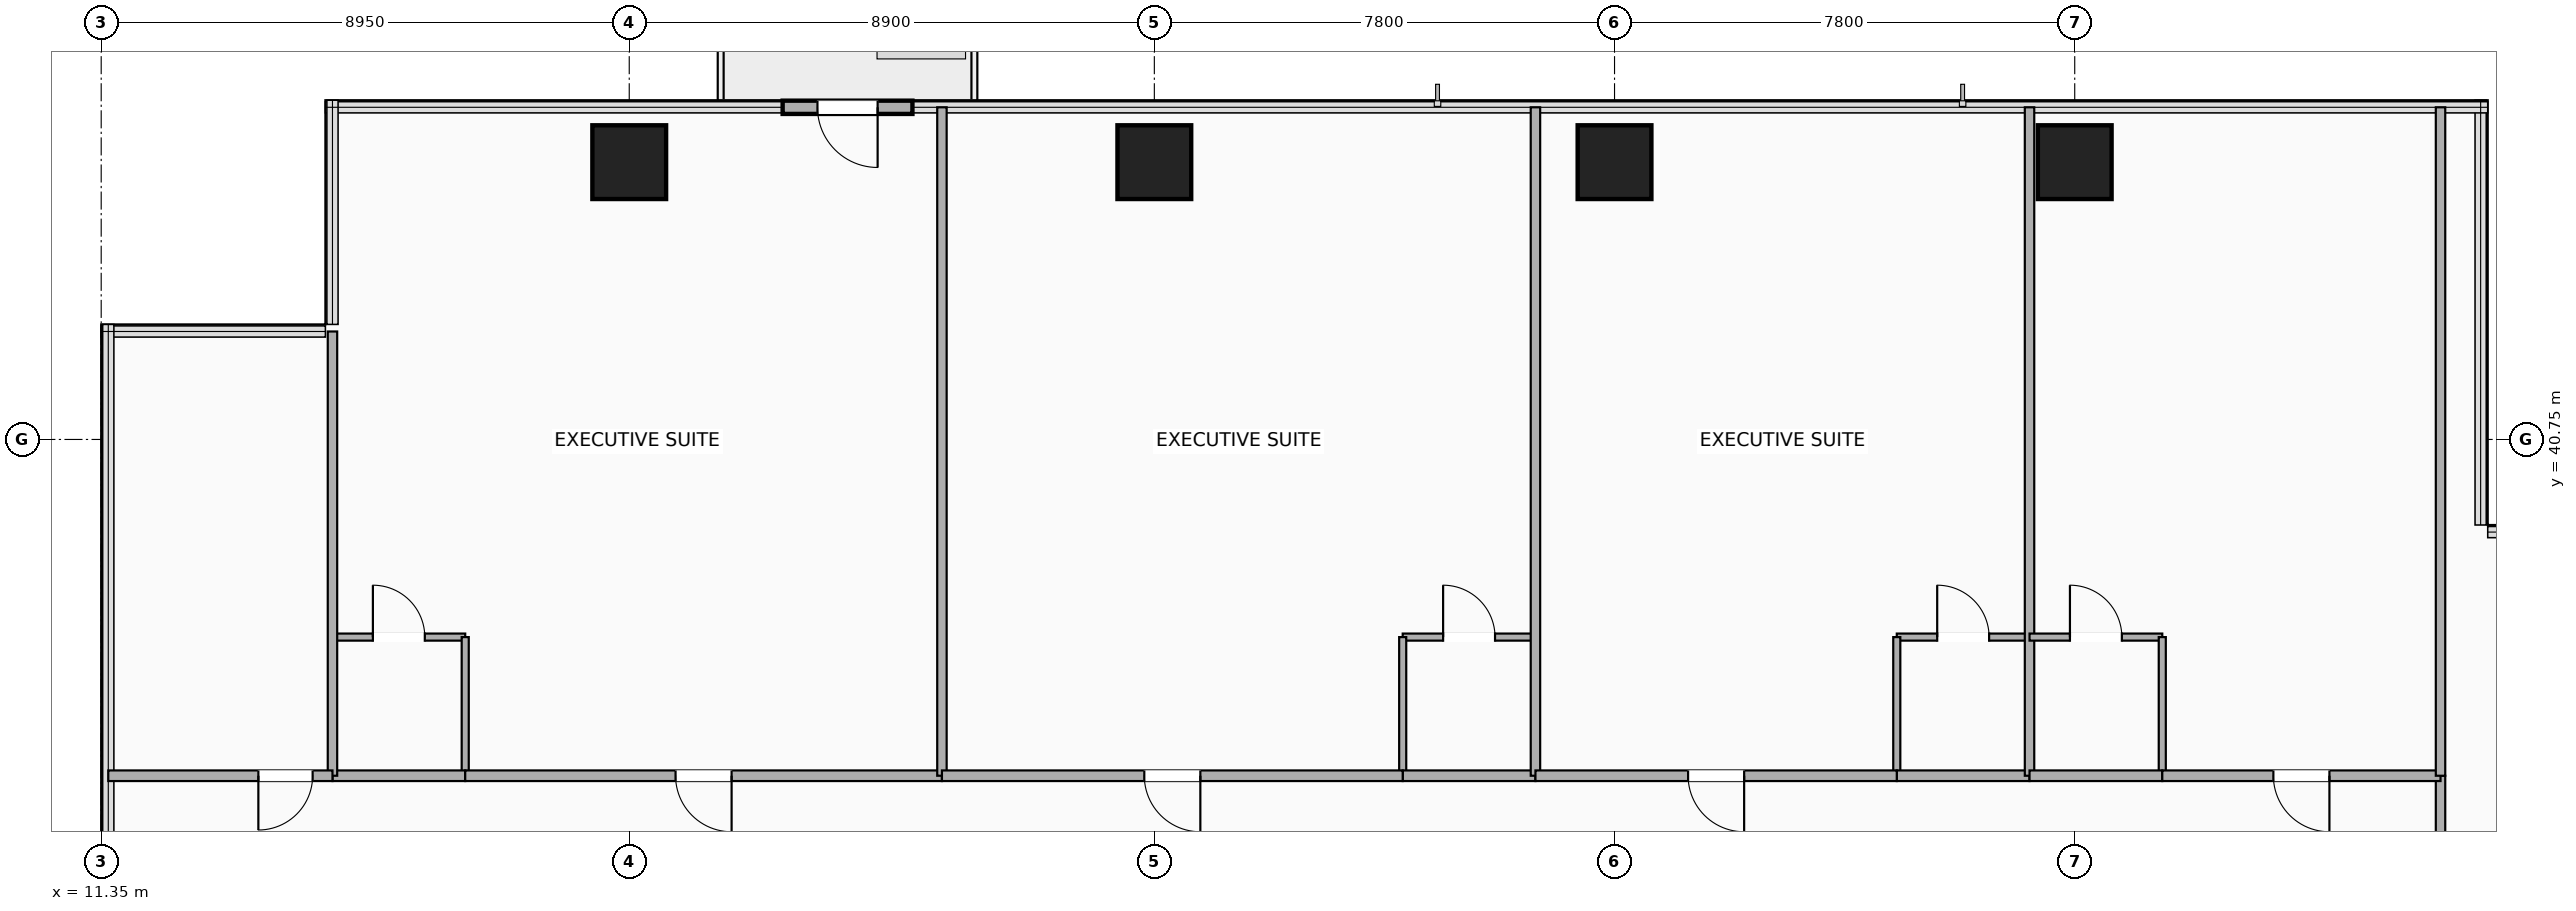
"""IFC4 building model, lengths in metres.
Left out: names, types, materials, properties, quantities, classifications, styles, units other than length and angle.
Written with IfcOpenShell. Run it as: python <this file> out.ifc"""

import sys

from ifc_helpers import new_model, si_unit, direction, frame, frame_2d, origin, origin_2d, place, context, subcontext, project, spatial, rectangle, extrude, element, fill, save


model = new_model("IFC4")
c1 = context("Model", 3, precision=1e-05, world=origin(), true_north=direction((0.0, 1.0)))
c2 = subcontext(c1, "Body", "Model", "MODEL_VIEW")
j1 = project(units=[si_unit("LENGTHUNIT", "METRE"), si_unit("PLANEANGLEUNIT", "RADIAN")], contexts=[c1])
p1 = place(None, origin())
s1 = spatial("IfcSite", under=j1, at=p1, CompositionType="ELEMENT")
p2 = place(p1, origin())
s2 = spatial("IfcBuilding", under=s1, at=p2, CompositionType="ELEMENT")
p3 = place(p2, frame((0.0, 0.0, 95.2)))
s3 = spatial("IfcBuildingStorey", under=s2, at=p3, CompositionType="ELEMENT", Elevation=95.2)
for number, where, z_axis, x_axis in (
    (1, (20.3, 45.45, -0.26), (0.0, 0.0, 1.0), (1.0, 0.0, 0.0)),
    (2, (29.2, 45.45, -0.26), (0.0, 0.0, 1.0), (1.0, 0.0, 0.0)),
    (3, (37.0, 45.45, -0.26), (0.0, 0.0, 1.0), (1.0, 0.0, 0.0)),
    (4, (44.8, 45.45, -0.26), (0.0, 0.0, 1.0), (1.0, 0.0, 0.0)),
):
    element("IfcColumn", number, at=place(p3, frame(where, z_axis=z_axis, x_axis=x_axis)), inside=s3, PredefinedType="COLUMN", context=c2, shape_type="SweptSolid", body=[
        extrude(rectangle(XDim=1.25, YDim=1.25, at=origin_2d()), origin(), (0.0, 0.0, 1.0), 3.5),
    ])
p4 = place(p3, frame((22.9, 46.38, 0.0), z_axis=(0.0, 0.0, 1.0), x_axis=(1.0, 0.0, 0.0)))
e5 = element("IfcWall", 5, at=p4, inside=s3, PredefinedType="SOLIDWALL", context=c2, shape_type="SweptSolid", body=[
    extrude(rectangle(XDim=2.2, YDim=0.225, at=frame_2d((1.1, 0.0))), origin(), (0.0, 0.0, 1.0), 3.24),
])
p5 = place(p4, frame((0.59, 0.0, 0.0)))
e6 = element("IfcOpeningElement", 6, at=p5, cuts=e5, PredefinedType="OPENING", context=c2, shape_type="SweptSolid", body=[
    extrude(rectangle(XDim=1.02, YDim=2.1, at=frame_2d((0.51, 1.05))), frame((0.0, 0.123, 0.0), z_axis=(0.0, -1.0, 0.0), x_axis=(1.0, 0.0, 0.0)), (0.0, 0.0, 1.0), 0.245),
])
p6 = place(p3, frame((51.0, 33.0, 0.0), z_axis=(0.0, 0.0, 1.0), x_axis=(0.0, 1.0, 0.0)))
e7 = element("IfcWall", 7, at=p6, inside=s3, PredefinedType="PARTITIONING", context=c2, shape_type="SweptSolid", body=[
    extrude(rectangle(XDim=2.05, YDim=0.16, at=frame_2d((1.025, 0.0))), origin(), (0.0, 0.0, 1.0), 2.313),
])
p7 = place(p3, frame((15.27, 37.4, 0.0), z_axis=(0.0, 0.0, 1.0), x_axis=(1.0, 0.0, 0.0)))
e8 = element("IfcWall", 8, at=p7, inside=s3, PredefinedType="PARTITIONING", context=c2, shape_type="SweptSolid", body=[
    extrude(rectangle(XDim=2.25, YDim=0.12, at=frame_2d((1.125, 0.0))), origin(), (0.0, 0.0, 1.0), 3.24),
])
p8 = place(p7, frame((1.565, 0.0, 0.0), z_axis=(0.0, 0.0, 1.0), x_axis=(-1.0, 0.0, 0.0)))
e9 = element("IfcOpeningElement", 9, at=p8, cuts=e8, PredefinedType="OPENING", context=c2, shape_type="SweptSolid", body=[
    extrude(rectangle(XDim=0.88, YDim=2.08, at=frame_2d((0.44, 1.04))), frame((0.0, 0.07, 0.0), z_axis=(0.0, -1.0, 0.0), x_axis=(1.0, 0.0, 0.0)), (0.0, 0.0, 1.0), 0.14),
])
p9 = place(p3, frame((17.52, 35.05, 0.0), z_axis=(0.0, 0.0, 1.0), x_axis=(0.0, 1.0, 0.0)))
e10 = element("IfcWall", 10, at=p9, inside=s3, PredefinedType="PARTITIONING", context=c2, shape_type="SweptSolid", body=[
    extrude(rectangle(XDim=2.35, YDim=0.12, at=frame_2d((1.175, 0.0))), origin(), (0.0, 0.0, 1.0), 3.24),
])
p10 = place(p3, frame((15.27, 35.05, 0.0), z_axis=(0.0, 0.0, 1.0), x_axis=(1.0, 0.0, 0.0)))
e11 = element("IfcWall", 11, at=p10, inside=s3, PredefinedType="PARTITIONING", context=c2, shape_type="SweptSolid", body=[
    extrude(rectangle(XDim=2.25, YDim=0.18, at=frame_2d((1.125, 0.0))), origin(), (0.0, 0.0, 1.0), 3.24),
])
p11 = place(p3, frame((17.52, 35.05, 0.0), z_axis=(0.0, 0.0, 1.0), x_axis=(1.0, 0.0, 0.0)))
e12 = element("IfcWall", 12, at=p11, inside=s3, PredefinedType="PARTITIONING", context=c2, shape_type="SweptSolid", body=[
    extrude(rectangle(XDim=8.08, YDim=0.18, at=frame_2d((4.04, 0.0))), origin(), (0.0, 0.0, 1.0), 2.313),
])
p12 = place(p11, frame((3.565, 0.0, 0.0)))
e13 = element("IfcOpeningElement", 13, at=p12, cuts=e12, PredefinedType="OPENING", context=c2, shape_type="SweptSolid", body=[
    extrude(rectangle(XDim=0.95, YDim=2.15, at=frame_2d((0.475, 1.075))), frame((0.0, 0.1, 0.0), z_axis=(0.0, -1.0, 0.0), x_axis=(1.0, 0.0, 0.0)), (0.0, 0.0, 1.0), 0.2),
])
p13 = place(p3, frame((15.27, 35.05, 0.0), z_axis=(0.0, 0.0, 1.0), x_axis=(0.0, 1.0, 0.0)))
e14 = element("IfcWall", 14, at=p13, inside=s3, PredefinedType="PARTITIONING", context=c2, shape_type="SweptSolid", body=[
    extrude(rectangle(XDim=7.53, YDim=0.16, at=frame_2d((3.765, 0.0))), origin(), (0.0, 0.0, 1.0), 3.24),
])
p14 = place(p3, frame((25.6, 35.05, 0.0), z_axis=(0.0, 0.0, 1.0), x_axis=(0.0, 1.0, 0.0)))
e15 = element("IfcWall", 15, at=p14, inside=s3, PredefinedType="PARTITIONING", context=c2, shape_type="SweptSolid", body=[
    extrude(rectangle(XDim=11.33, YDim=0.16, at=frame_2d((5.665, 0.0))), origin(), (0.0, 0.0, 1.0), 2.603),
])
p15 = place(p3, frame((33.41, 37.4, 0.0), z_axis=(0.0, 0.0, 1.0), x_axis=(1.0, 0.0, 0.0)))
e16 = element("IfcWall", 16, at=p15, inside=s3, PredefinedType="PARTITIONING", context=c2, shape_type="SweptSolid", body=[
    extrude(rectangle(XDim=2.25, YDim=0.12, at=frame_2d((1.125, 0.0))), origin(), (0.0, 0.0, 1.0), 3.24),
])
p16 = place(p15, frame((1.565, 0.0, 0.0), z_axis=(0.0, 0.0, 1.0), x_axis=(-1.0, 0.0, 0.0)))
e17 = element("IfcOpeningElement", 17, at=p16, cuts=e16, PredefinedType="OPENING", context=c2, shape_type="SweptSolid", body=[
    extrude(rectangle(XDim=0.88, YDim=2.08, at=frame_2d((0.44, 1.04))), frame((0.0, 0.07, 0.0), z_axis=(0.0, -1.0, 0.0), x_axis=(1.0, 0.0, 0.0)), (0.0, 0.0, 1.0), 0.14),
])
p17 = place(p3, frame((33.41, 35.05, 0.0), z_axis=(0.0, 0.0, 1.0), x_axis=(0.0, 1.0, 0.0)))
e18 = element("IfcWall", 18, at=p17, inside=s3, PredefinedType="PARTITIONING", context=c2, shape_type="SweptSolid", body=[
    extrude(rectangle(XDim=2.35, YDim=0.12, at=frame_2d((1.175, 0.0))), origin(), (0.0, 0.0, 1.0), 2.922),
])
p18 = place(p3, frame((33.41, 35.05, 0.0), z_axis=(0.0, 0.0, 1.0), x_axis=(1.0, 0.0, 0.0)))
e19 = element("IfcWall", 19, at=p18, inside=s3, PredefinedType="PARTITIONING", context=c2, shape_type="SweptSolid", body=[
    extrude(rectangle(XDim=2.25, YDim=0.18, at=frame_2d((1.125, 0.0))), origin(), (0.0, 0.0, 1.0), 3.24),
])
p19 = place(p3, frame((25.6, 35.05, 0.0), z_axis=(0.0, 0.0, 1.0), x_axis=(1.0, 0.0, 0.0)))
e20 = element("IfcWall", 20, at=p19, inside=s3, PredefinedType="PARTITIONING", context=c2, shape_type="SweptSolid", body=[
    extrude(rectangle(XDim=7.81, YDim=0.18, at=frame_2d((3.905, 0.0))), origin(), (0.0, 0.0, 1.0), 2.313),
])
p20 = place(p19, frame((3.43, 0.0, 0.0)))
e21 = element("IfcOpeningElement", 21, at=p20, cuts=e20, PredefinedType="OPENING", context=c2, shape_type="SweptSolid", body=[
    extrude(rectangle(XDim=0.95, YDim=2.15, at=frame_2d((0.475, 1.075))), frame((0.0, 0.1, 0.0), z_axis=(0.0, -1.0, 0.0), x_axis=(1.0, 0.0, 0.0)), (0.0, 0.0, 1.0), 0.2),
])
p21 = place(p3, frame((35.66, 35.05, 0.0), z_axis=(0.0, 0.0, 1.0), x_axis=(0.0, 1.0, 0.0)))
e22 = element("IfcWall", 22, at=p21, inside=s3, PredefinedType="PARTITIONING", context=c2, shape_type="SweptSolid", body=[
    extrude(rectangle(XDim=11.33, YDim=0.16, at=frame_2d((5.665, 0.0))), origin(), (0.0, 0.0, 1.0), 2.603),
])
p22 = place(p3, frame((41.784, 37.4, 0.0), z_axis=(0.0, 0.0, 1.0), x_axis=(1.0, 0.0, 0.0)))
e23 = element("IfcWall", 23, at=p22, inside=s3, PredefinedType="PARTITIONING", context=c2, shape_type="SweptSolid", body=[
    extrude(rectangle(XDim=2.25, YDim=0.12, at=frame_2d((1.125, 0.0))), origin(), (0.0, 0.0, 1.0), 3.24),
])
p23 = place(p22, frame((1.565, 0.0, 0.0), z_axis=(0.0, 0.0, 1.0), x_axis=(-1.0, 0.0, 0.0)))
e24 = element("IfcOpeningElement", 24, at=p23, cuts=e23, PredefinedType="OPENING", context=c2, shape_type="SweptSolid", body=[
    extrude(rectangle(XDim=0.88, YDim=2.08, at=frame_2d((0.44, 1.04))), frame((0.0, 0.07, 0.0), z_axis=(0.0, -1.0, 0.0), x_axis=(1.0, 0.0, 0.0)), (0.0, 0.0, 1.0), 0.14),
])
p24 = place(p3, frame((41.784, 35.05, 0.0), z_axis=(0.0, 0.0, 1.0), x_axis=(0.0, 1.0, 0.0)))
e25 = element("IfcWall", 25, at=p24, inside=s3, PredefinedType="PARTITIONING", context=c2, shape_type="SweptSolid", body=[
    extrude(rectangle(XDim=2.35, YDim=0.12, at=frame_2d((1.175, 0.0))), origin(), (0.0, 0.0, 1.0), 2.922),
])
p25 = place(p3, frame((41.784, 35.05, 0.0), z_axis=(0.0, 0.0, 1.0), x_axis=(1.0, 0.0, 0.0)))
e26 = element("IfcWall", 26, at=p25, inside=s3, PredefinedType="PARTITIONING", context=c2, shape_type="SweptSolid", body=[
    extrude(rectangle(XDim=2.25, YDim=0.18, at=frame_2d((1.125, 0.0))), origin(), (0.0, 0.0, 1.0), 3.24),
])
p26 = place(p3, frame((35.66, 35.05, 0.0), z_axis=(0.0, 0.0, 1.0), x_axis=(1.0, 0.0, 0.0)))
e27 = element("IfcWall", 27, at=p26, inside=s3, PredefinedType="PARTITIONING", context=c2, shape_type="SweptSolid", body=[
    extrude(rectangle(XDim=6.124, YDim=0.18, at=frame_2d((3.062, 0.0))), origin(), (0.0, 0.0, 1.0), 2.313),
])
p27 = place(p26, frame((2.587, 0.0, 0.0)))
e28 = element("IfcOpeningElement", 28, at=p27, cuts=e27, PredefinedType="OPENING", context=c2, shape_type="SweptSolid", body=[
    extrude(rectangle(XDim=0.95, YDim=2.15, at=frame_2d((0.475, 1.075))), frame((0.0, 0.1, 0.0), z_axis=(0.0, -1.0, 0.0), x_axis=(1.0, 0.0, 0.0)), (0.0, 0.0, 1.0), 0.2),
])
p28 = place(p3, frame((44.034, 35.05, 0.0), z_axis=(0.0, 0.0, 1.0), x_axis=(0.0, 1.0, 0.0)))
e29 = element("IfcWall", 29, at=p28, inside=s3, PredefinedType="PARTITIONING", context=c2, shape_type="SweptSolid", body=[
    extrude(rectangle(XDim=11.33, YDim=0.16, at=frame_2d((5.665, 0.0))), origin(), (0.0, 0.0, 1.0), 2.603),
])
p29 = place(p3, frame((44.034, 37.4, 0.0), z_axis=(0.0, 0.0, 1.0), x_axis=(1.0, 0.0, 0.0)))
e30 = element("IfcWall", 30, at=p29, inside=s3, PredefinedType="PARTITIONING", context=c2, shape_type="SweptSolid", body=[
    extrude(rectangle(XDim=2.25, YDim=0.12, at=frame_2d((1.125, 0.0))), origin(), (0.0, 0.0, 1.0), 2.313),
])
p30 = place(p29, frame((1.565, 0.0, 0.0), z_axis=(0.0, 0.0, 1.0), x_axis=(-1.0, 0.0, 0.0)))
e31 = element("IfcOpeningElement", 31, at=p30, cuts=e30, PredefinedType="OPENING", context=c2, shape_type="SweptSolid", body=[
    extrude(rectangle(XDim=0.88, YDim=2.08, at=frame_2d((0.44, 1.04))), frame((0.0, 0.07, 0.0), z_axis=(0.0, -1.0, 0.0), x_axis=(1.0, 0.0, 0.0)), (0.0, 0.0, 1.0), 0.14),
])
p31 = place(p3, frame((46.284, 35.05, 0.0), z_axis=(0.0, 0.0, 1.0), x_axis=(0.0, 1.0, 0.0)))
e32 = element("IfcWall", 32, at=p31, inside=s3, PredefinedType="PARTITIONING", context=c2, shape_type="SweptSolid", body=[
    extrude(rectangle(XDim=2.35, YDim=0.12, at=frame_2d((1.175, 0.0))), origin(), (0.0, 0.0, 1.0), 3.24),
])
p32 = place(p3, frame((44.034, 35.05, 0.0), z_axis=(0.0, 0.0, 1.0), x_axis=(1.0, 0.0, 0.0)))
e33 = element("IfcWall", 33, at=p32, inside=s3, PredefinedType="PARTITIONING", context=c2, shape_type="SweptSolid", body=[
    extrude(rectangle(XDim=2.25, YDim=0.18, at=frame_2d((1.125, 0.0))), origin(), (0.0, 0.0, 1.0), 2.313),
])
p33 = place(p3, frame((46.284, 35.05, 0.0), z_axis=(0.0, 0.0, 1.0), x_axis=(1.0, 0.0, 0.0)))
e34 = element("IfcWall", 34, at=p33, inside=s3, PredefinedType="PARTITIONING", context=c2, shape_type="SweptSolid", body=[
    extrude(rectangle(XDim=4.716, YDim=0.18, at=frame_2d((2.358, 0.0))), origin(), (0.0, 0.0, 1.0), 3.24),
])
p34 = place(p33, frame((1.883, 0.0, 0.0)))
e35 = element("IfcOpeningElement", 35, at=p34, cuts=e34, PredefinedType="OPENING", context=c2, shape_type="SweptSolid", body=[
    extrude(rectangle(XDim=0.95, YDim=2.15, at=frame_2d((0.475, 1.075))), frame((0.0, 0.1, 0.0), z_axis=(0.0, -1.0, 0.0), x_axis=(1.0, 0.0, 0.0)), (0.0, 0.0, 1.0), 0.2),
])
p35 = place(p3, frame((51.0, 35.05, 0.0), z_axis=(0.0, 0.0, 1.0), x_axis=(0.0, 1.0, 0.0)))
e36 = element("IfcWall", 36, at=p35, inside=s3, PredefinedType="PARTITIONING", context=c2, shape_type="SweptSolid", body=[
    extrude(rectangle(XDim=11.33, YDim=0.16, at=frame_2d((5.665, 0.0))), origin(), (0.0, 0.0, 1.0), 3.24),
])
p36 = place(p3, frame((11.47, 35.05, 0.0), z_axis=(0.0, 0.0, 1.0), x_axis=(1.0, 0.0, 0.0)))
e37 = element("IfcWall", 37, at=p36, inside=s3, PredefinedType="PARTITIONING", context=c2, shape_type="SweptSolid", body=[
    extrude(rectangle(XDim=3.8, YDim=0.18, at=frame_2d((1.9, 0.0))), origin(), (0.0, 0.0, 1.0), 3.24),
])
p37 = place(p36, frame((2.544, 0.0, 0.0)))
e38 = element("IfcOpeningElement", 38, at=p37, cuts=e37, PredefinedType="OPENING", context=c2, shape_type="SweptSolid", body=[
    extrude(rectangle(XDim=0.92, YDim=2.08, at=frame_2d((0.46, 1.04))), frame((0.0, 0.1, 0.0), z_axis=(0.0, -1.0, 0.0), x_axis=(1.0, 0.0, 0.0)), (0.0, 0.0, 1.0), 0.2),
])
p38 = place(p5, origin())
e39 = element("IfcDoor", 39, at=p38, inside=s3, OperationType="SINGLE_SWING_RIGHT", PredefinedType="DOOR", context=c2, shape_type="SweptSolid", body=[
    extrude(rectangle(XDim=1.02, YDim=2.1, at=frame_2d((0.51, 1.05))), frame((0.0, 0.025, 0.0), z_axis=(0.0, -1.0, 0.0), x_axis=(1.0, 0.0, 0.0)), (0.0, 0.0, 1.0), 0.05),
])
fill(e6, e39)
p39 = place(p8, origin())
e40 = element("IfcDoor", 40, at=p39, inside=s3, OperationType="SINGLE_SWING_LEFT", PredefinedType="DOOR", context=c2, shape_type="SweptSolid", body=[
    extrude(rectangle(XDim=0.88, YDim=2.08, at=frame_2d((0.44, 1.04))), frame((0.0, 0.025, 0.0), z_axis=(0.0, -1.0, 0.0), x_axis=(1.0, 0.0, 0.0)), (0.0, 0.0, 1.0), 0.05),
])
fill(e9, e40)
p40 = place(p12, origin())
e41 = element("IfcDoor", 41, at=p40, inside=s3, OperationType="SINGLE_SWING_RIGHT", PredefinedType="DOOR", context=c2, shape_type="SweptSolid", body=[
    extrude(rectangle(XDim=0.95, YDim=2.15, at=frame_2d((0.475, 1.075))), frame((0.0, 0.025, 0.0), z_axis=(0.0, -1.0, 0.0), x_axis=(1.0, 0.0, 0.0)), (0.0, 0.0, 1.0), 0.05),
])
fill(e13, e41)
p41 = place(p16, origin())
e42 = element("IfcDoor", 42, at=p41, inside=s3, OperationType="SINGLE_SWING_LEFT", PredefinedType="DOOR", context=c2, shape_type="SweptSolid", body=[
    extrude(rectangle(XDim=0.88, YDim=2.08, at=frame_2d((0.44, 1.04))), frame((0.0, 0.025, 0.0), z_axis=(0.0, -1.0, 0.0), x_axis=(1.0, 0.0, 0.0)), (0.0, 0.0, 1.0), 0.05),
])
fill(e17, e42)
p42 = place(p20, origin())
e43 = element("IfcDoor", 43, at=p42, inside=s3, OperationType="SINGLE_SWING_RIGHT", PredefinedType="DOOR", context=c2, shape_type="SweptSolid", body=[
    extrude(rectangle(XDim=0.95, YDim=2.15, at=frame_2d((0.475, 1.075))), frame((0.0, 0.025, 0.0), z_axis=(0.0, -1.0, 0.0), x_axis=(1.0, 0.0, 0.0)), (0.0, 0.0, 1.0), 0.05),
])
fill(e21, e43)
p43 = place(p23, origin())
e44 = element("IfcDoor", 44, at=p43, inside=s3, OperationType="SINGLE_SWING_LEFT", PredefinedType="DOOR", context=c2, shape_type="SweptSolid", body=[
    extrude(rectangle(XDim=0.88, YDim=2.08, at=frame_2d((0.44, 1.04))), frame((0.0, 0.025, 0.0), z_axis=(0.0, -1.0, 0.0), x_axis=(1.0, 0.0, 0.0)), (0.0, 0.0, 1.0), 0.05),
])
fill(e24, e44)
p44 = place(p27, origin())
e45 = element("IfcDoor", 45, at=p44, inside=s3, OperationType="SINGLE_SWING_RIGHT", PredefinedType="DOOR", context=c2, shape_type="SweptSolid", body=[
    extrude(rectangle(XDim=0.95, YDim=2.15, at=frame_2d((0.475, 1.075))), frame((0.0, 0.025, 0.0), z_axis=(0.0, -1.0, 0.0), x_axis=(1.0, 0.0, 0.0)), (0.0, 0.0, 1.0), 0.05),
])
fill(e28, e45)
p45 = place(p30, origin())
e46 = element("IfcDoor", 46, at=p45, inside=s3, OperationType="SINGLE_SWING_LEFT", PredefinedType="DOOR", context=c2, shape_type="SweptSolid", body=[
    extrude(rectangle(XDim=0.88, YDim=2.08, at=frame_2d((0.44, 1.04))), frame((0.0, 0.025, 0.0), z_axis=(0.0, -1.0, 0.0), x_axis=(1.0, 0.0, 0.0)), (0.0, 0.0, 1.0), 0.05),
])
fill(e31, e46)
p46 = place(p34, origin())
e47 = element("IfcDoor", 47, at=p46, inside=s3, OperationType="SINGLE_SWING_RIGHT", PredefinedType="DOOR", context=c2, shape_type="SweptSolid", body=[
    extrude(rectangle(XDim=0.95, YDim=2.15, at=frame_2d((0.475, 1.075))), frame((0.0, 0.025, 0.0), z_axis=(0.0, -1.0, 0.0), x_axis=(1.0, 0.0, 0.0)), (0.0, 0.0, 1.0), 0.05),
])
fill(e35, e47)
p47 = place(p37, origin())
e48 = element("IfcDoor", 48, at=p47, inside=s3, OperationType="SINGLE_SWING_LEFT", PredefinedType="DOOR", context=c2, shape_type="SweptSolid", body=[
    extrude(rectangle(XDim=0.92, YDim=2.08, at=frame_2d((0.46, 1.04))), frame((0.0, 0.025, 0.0), z_axis=(0.0, -1.0, 0.0), x_axis=(1.0, 0.0, 0.0)), (0.0, 0.0, 1.0), 0.05),
])
fill(e38, e48)
save(model, sys.argv[1])
